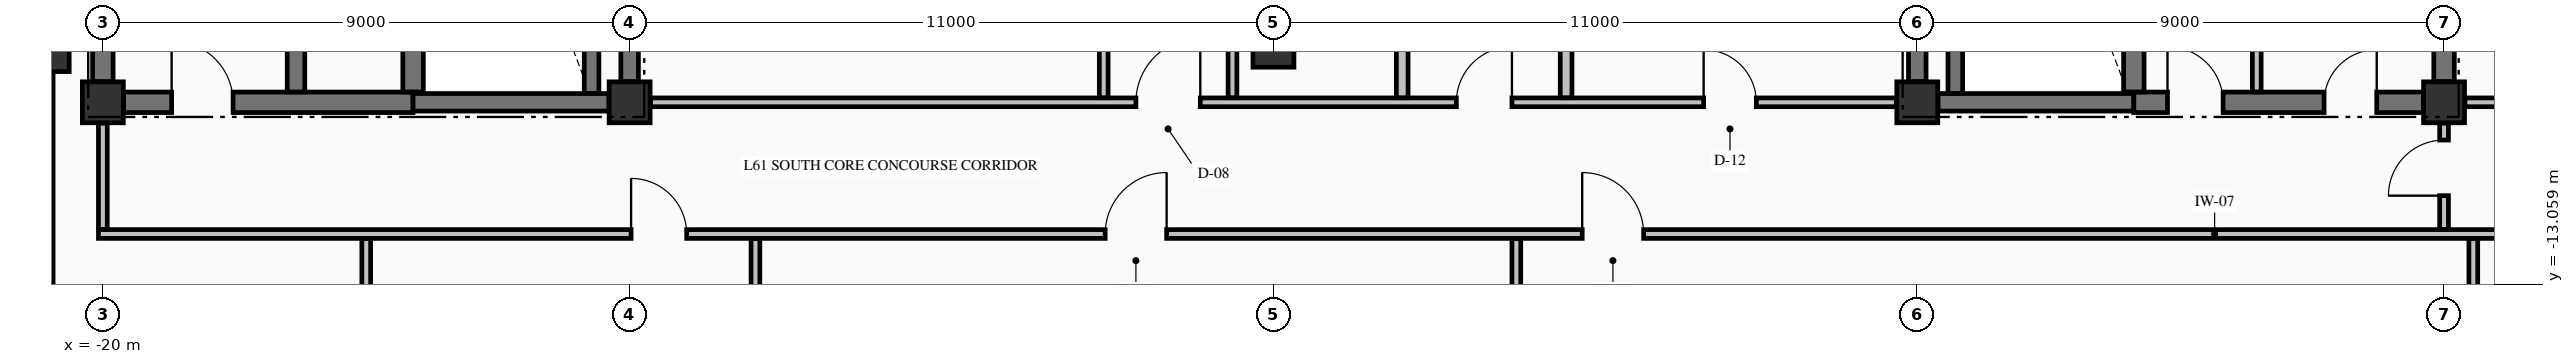
"""IFC4 building model, lengths in metres.
Left out: names, types, materials, properties, quantities, classifications, styles, units other than length and angle.
Written with IfcOpenShell. Run it as: python <this file> out.ifc"""

import sys

from ifc_helpers import new_model, si_unit, direction, frame, frame_2d, origin, origin_2d, place, context, subcontext, project, spatial, rectangle, extrude, element, fill, save


model = new_model("IFC4")
c1 = context("Model", 3, precision=1e-05, world=origin(), true_north=direction((0.0, 1.0)))
c2 = subcontext(c1, "Body", "Model", "MODEL_VIEW")
j1 = project(units=[si_unit("LENGTHUNIT", "METRE"), si_unit("PLANEANGLEUNIT", "RADIAN")], contexts=[c1])
p1 = place(None, origin())
s1 = spatial("IfcSite", under=j1, at=p1, CompositionType="ELEMENT")
p2 = place(p1, origin())
s2 = spatial("IfcBuilding", under=s1, at=p2, CompositionType="ELEMENT")
p3 = place(p2, frame((0.0, 0.0, 233.28)))
s3 = spatial("IfcBuildingStorey", under=s2, at=p3, CompositionType="ELEMENT", Elevation=233.28)
p4 = place(p3, frame((-21.0, -9.0, -0.25), z_axis=(0.0, 0.0, 1.0), x_axis=(1.0, 0.0, 0.0)))
e1 = element("IfcColumn", 1, at=p4, inside=s3, PredefinedType="COLUMN", context=c2, shape_type="SweptSolid", body=[
    extrude(rectangle(XDim=0.85, YDim=0.85, at=origin_2d()), origin(), (0.0, 0.0, 1.0), 3.23),
])
for number, where, z_axis, x_axis in (
    (2, (-20.0, -9.95, -0.25), (0.0, 0.0, 1.0), (1.0, 0.0, 0.0)),
    (3, (-11.0, -9.95, -0.25), (0.0, 0.0, 1.0), (1.0, 0.0, 0.0)),
    (4, (11.0, -9.95, -0.25), (0.0, 0.0, 1.0), (1.0, 0.0, 0.0)),
    (5, (20.0, -9.95, -0.25), (0.0, 0.0, 1.0), (1.0, 0.0, 0.0)),
    (6, (0.0, -9.0, -0.25), (0.0, 0.0, 1.0), (1.0, 0.0, 0.0)),
):
    element("IfcColumn", number, at=place(p3, frame(where, z_axis=z_axis, x_axis=x_axis)), inside=s3, PredefinedType="COLUMN", context=c2, shape_type="SweptSolid", body=[
        extrude(rectangle(XDim=0.7, YDim=0.7, at=origin_2d()), origin(), (0.0, 0.0, 1.0), 3.23),
    ])
p5 = place(p3, frame((-21.0, -9.455, 0.0), z_axis=(0.0, 0.0, 1.0), x_axis=(0.0, -1.0, 0.0)))
e7 = element("IfcWall", 7, at=p5, inside=s3, PredefinedType="STANDARD", context=c2, shape_type="SweptSolid", body=[
    extrude(rectangle(XDim=8.09, YDim=0.3, at=frame_2d((4.045, 0.0))), origin(), (0.0, 0.0, 1.0), 2.372),
])
p6 = place(p3, frame((-19.646, -9.95, 0.0), z_axis=(0.0, 0.0, 1.0), x_axis=(1.0, 0.0, 0.0)))
e8 = element("IfcWall", 8, at=p6, inside=s3, PredefinedType="SHEAR", context=c2, shape_type="SweptSolid", body=[
    extrude(rectangle(XDim=4.946, YDim=0.35, at=frame_2d((2.473, 0.0))), origin(), (0.0, 0.0, 1.0), 2.98),
])
p7 = place(p6, frame((0.821, 0.0, 0.0)))
e9 = element("IfcOpeningElement", 9, at=p7, cuts=e8, PredefinedType="OPENING", context=c2, shape_type="SweptSolid", body=[
    extrude(rectangle(XDim=1.05, YDim=2.15, at=frame_2d((0.525, 1.075))), frame((0.0, 0.185, 0.0), z_axis=(0.0, -1.0, 0.0), x_axis=(1.0, 0.0, 0.0)), (0.0, 0.0, 1.0), 0.37),
])
for number, where, z_axis, x_axis in (
    (10, (-14.7, -9.95, 0.0), (0.0, 0.0, 1.0), (1.0, 0.0, 0.0)),
    (11, (11.354, -9.95, 0.0), (0.0, 0.0, 1.0), (1.0, 0.0, 0.0)),
):
    element("IfcWall", number, at=place(p3, frame(where, z_axis=z_axis, x_axis=x_axis)), inside=s3, PredefinedType="SHEAR", context=c2, shape_type="SweptSolid", body=[
        extrude(rectangle(XDim=3.346, YDim=0.3, at=frame_2d((1.673, 0.0))), origin(), (0.0, 0.0, 1.0), 2.98),
    ])
p8 = place(p3, frame((14.7, -9.95, 0.0), z_axis=(0.0, 0.0, 1.0), x_axis=(1.0, 0.0, 0.0)))
e12 = element("IfcWall", 12, at=p8, inside=s3, PredefinedType="SHEAR", context=c2, shape_type="SweptSolid", body=[
    extrude(rectangle(XDim=4.946, YDim=0.35, at=frame_2d((2.473, 0.0))), origin(), (0.0, 0.0, 1.0), 2.98),
])
p9 = place(p8, frame((3.25, 0.0, 0.0)))
e13 = element("IfcOpeningElement", 13, at=p9, cuts=e12, PredefinedType="OPENING", context=c2, shape_type="SweptSolid", body=[
    extrude(rectangle(XDim=0.9, YDim=2.15, at=frame_2d((0.45, 1.075))), frame((0.0, 0.185, 0.0), z_axis=(0.0, -1.0, 0.0), x_axis=(1.0, 0.0, 0.0)), (0.0, 0.0, 1.0), 0.37),
])
p10 = place(p8, frame((0.575, 0.0, 0.0)))
e14 = element("IfcOpeningElement", 14, at=p10, cuts=e12, PredefinedType="OPENING", context=c2, shape_type="SweptSolid", body=[
    extrude(rectangle(XDim=0.95, YDim=2.15, at=frame_2d((0.475, 1.075))), frame((0.0, 0.185, 0.0), z_axis=(0.0, -1.0, 0.0), x_axis=(1.0, 0.0, 0.0)), (0.0, 0.0, 1.0), 0.37),
])
p11 = place(p3, frame((-20.075, -12.2, 0.0), z_axis=(0.0, 0.0, 1.0), x_axis=(1.0, 0.0, 0.0)))
e15 = element("IfcWall", 15, at=p11, inside=s3, PredefinedType="PARTITIONING", context=c2, shape_type="SweptSolid", body=[
    extrude(rectangle(XDim=45.91, YDim=0.15, at=frame_2d((22.955, 0.0))), origin(), (0.0, 0.0, 1.0), 2.98),
])
p12 = place(p11, frame((9.1, 0.0, 0.0)))
e16 = element("IfcOpeningElement", 16, at=p12, cuts=e15, PredefinedType="OPENING", context=c2, shape_type="SweptSolid", body=[
    extrude(rectangle(XDim=0.95, YDim=2.15, at=frame_2d((0.475, 1.075))), frame((0.0, 0.085, 0.0), z_axis=(0.0, -1.0, 0.0), x_axis=(1.0, 0.0, 0.0)), (0.0, 0.0, 1.0), 0.17),
])
p13 = place(p11, frame((17.2, 0.0, 0.0)))
e17 = element("IfcOpeningElement", 17, at=p13, cuts=e15, PredefinedType="OPENING", context=c2, shape_type="SweptSolid", body=[
    extrude(rectangle(XDim=1.05, YDim=2.15, at=frame_2d((0.525, 1.075))), frame((0.0, 0.085, 0.0), z_axis=(0.0, -1.0, 0.0), x_axis=(1.0, 0.0, 0.0)), (0.0, 0.0, 1.0), 0.17),
])
p14 = place(p11, frame((25.35, 0.0, 0.0)))
e18 = element("IfcOpeningElement", 18, at=p14, cuts=e15, PredefinedType="OPENING", context=c2, shape_type="SweptSolid", body=[
    extrude(rectangle(XDim=1.05, YDim=2.15, at=frame_2d((0.525, 1.075))), frame((0.0, 0.085, 0.0), z_axis=(0.0, -1.0, 0.0), x_axis=(1.0, 0.0, 0.0)), (0.0, 0.0, 1.0), 0.17),
])
p15 = place(p3, frame((-10.644, -9.95, 0.0), z_axis=(0.0, 0.0, 1.0), x_axis=(1.0, 0.0, 0.0)))
e19 = element("IfcWall", 19, at=p15, inside=s3, PredefinedType="PARTITIONING", context=c2, shape_type="SweptSolid", body=[
    extrude(rectangle(XDim=21.288, YDim=0.15, at=frame_2d((10.644, 0.0))), origin(), (0.0, 0.0, 1.0), 2.98),
])
p16 = place(p15, frame((8.294, 0.0, 0.0)))
e20 = element("IfcOpeningElement", 20, at=p16, cuts=e19, PredefinedType="OPENING", context=c2, shape_type="SweptSolid", body=[
    extrude(rectangle(XDim=1.1, YDim=2.15, at=frame_2d((0.55, 1.075))), frame((0.0, 0.085, 0.0), z_axis=(0.0, -1.0, 0.0), x_axis=(1.0, 0.0, 0.0)), (0.0, 0.0, 1.0), 0.17),
])
p17 = place(p15, frame((13.769, 0.0, 0.0)))
e21 = element("IfcOpeningElement", 21, at=p17, cuts=e19, PredefinedType="OPENING", context=c2, shape_type="SweptSolid", body=[
    extrude(rectangle(XDim=0.95, YDim=2.15, at=frame_2d((0.475, 1.075))), frame((0.0, 0.085, 0.0), z_axis=(0.0, -1.0, 0.0), x_axis=(1.0, 0.0, 0.0)), (0.0, 0.0, 1.0), 0.17),
])
p18 = place(p15, frame((17.994, 0.0, 0.0)))
e22 = element("IfcOpeningElement", 22, at=p18, cuts=e19, PredefinedType="OPENING", context=c2, shape_type="SweptSolid", body=[
    extrude(rectangle(XDim=0.9, YDim=2.15, at=frame_2d((0.45, 1.075))), frame((0.0, 0.085, 0.0), z_axis=(0.0, -1.0, 0.0), x_axis=(1.0, 0.0, 0.0)), (0.0, 0.0, 1.0), 0.17),
])
p19 = place(p3, frame((20.356, -9.95, 0.0), z_axis=(0.0, 0.0, 1.0), x_axis=(1.0, 0.0, 0.0)))
e23 = element("IfcWall", 23, at=p19, inside=s3, PredefinedType="PARTITIONING", context=c2, shape_type="SweptSolid", body=[
    extrude(rectangle(XDim=5.479, YDim=0.15, at=frame_2d((2.74, 0.0))), origin(), (0.0, 0.0, 1.0), 2.98),
])
p20 = place(p19, frame((2.169, 0.0, 0.0)))
e24 = element("IfcOpeningElement", 24, at=p20, cuts=e23, PredefinedType="OPENING", context=c2, shape_type="SweptSolid", body=[
    extrude(rectangle(XDim=0.95, YDim=2.15, at=frame_2d((0.475, 1.075))), frame((0.0, 0.085, 0.0), z_axis=(0.0, -1.0, 0.0), x_axis=(1.0, 0.0, 0.0)), (0.0, 0.0, 1.0), 0.17),
])
p21 = place(p3, frame((-20.0, -9.596, 0.0), z_axis=(0.0, 0.0, 1.0), x_axis=(0.0, 1.0, 0.0)))
e25 = element("IfcWall", 25, at=p21, inside=s3, PredefinedType="SHEAR", context=c2, shape_type="SweptSolid", body=[
    extrude(rectangle(XDim=9.194, YDim=0.35, at=frame_2d((4.597, 0.0))), origin(), (0.0, 0.0, 1.0), 2.98),
])
p22 = place(p3, frame((-16.7, -9.773, 0.0), z_axis=(0.0, 0.0, 1.0), x_axis=(0.0, 1.0, 0.0)))
e26 = element("IfcWall", 26, at=p22, inside=s3, PredefinedType="SHEAR", context=c2, shape_type="SweptSolid", body=[
    extrude(rectangle(XDim=9.371, YDim=0.3, at=frame_2d((4.686, 0.0))), origin(), (0.0, 0.0, 1.0), 2.98),
])
p23 = place(p3, frame((-14.7, -9.773, 0.0), z_axis=(0.0, 0.0, 1.0), x_axis=(0.0, 1.0, 0.0)))
e27 = element("IfcWall", 27, at=p23, inside=s3, PredefinedType="SHEAR", context=c2, shape_type="SweptSolid", body=[
    extrude(rectangle(XDim=9.371, YDim=0.35, at=frame_2d((4.686, 0.0))), origin(), (0.0, 0.0, 1.0), 2.98),
])
p24 = place(p3, frame((-11.65, -9.798, 0.0), z_axis=(0.0, 0.0, 1.0), x_axis=(0.0, 1.0, 0.0)))
e28 = element("IfcWall", 28, at=p24, inside=s3, PredefinedType="SOLIDWALL", context=c2, shape_type="SweptSolid", body=[
    extrude(rectangle(XDim=9.396, YDim=0.25, at=frame_2d((4.698, 0.0))), origin(), (0.0, 0.0, 1.0), 2.98),
])
for number, where, z_axis, x_axis in (
    (29, (-11.0, -9.596, 0.0), (0.0, 0.0, 1.0), (0.0, 1.0, 0.0)),
    (30, (11.0, -9.596, 0.0), (0.0, 0.0, 1.0), (0.0, 1.0, 0.0)),
):
    element("IfcWall", number, at=place(p3, frame(where, z_axis=z_axis, x_axis=x_axis)), inside=s3, PredefinedType="SHEAR", context=c2, shape_type="SweptSolid", body=[
        extrude(rectangle(XDim=9.242, YDim=0.3, at=frame_2d((4.621, 0.0))), origin(), (0.0, 0.0, 1.0), 2.98),
    ])
p25 = place(p3, frame((11.65, -9.798, 0.0), z_axis=(0.0, 0.0, 1.0), x_axis=(0.0, 1.0, 0.0)))
e31 = element("IfcWall", 31, at=p25, inside=s3, PredefinedType="SOLIDWALL", context=c2, shape_type="SweptSolid", body=[
    extrude(rectangle(XDim=9.396, YDim=0.25, at=frame_2d((4.698, 0.0))), origin(), (0.0, 0.0, 1.0), 2.98),
])
p26 = place(p3, frame((14.7, -9.773, 0.0), z_axis=(0.0, 0.0, 1.0), x_axis=(0.0, 1.0, 0.0)))
e32 = element("IfcWall", 32, at=p26, inside=s3, PredefinedType="SHEAR", context=c2, shape_type="SweptSolid", body=[
    extrude(rectangle(XDim=9.371, YDim=0.35, at=frame_2d((4.686, 0.0))), origin(), (0.0, 0.0, 1.0), 2.98),
])
p27 = place(p3, frame((20.0, -9.596, 0.0), z_axis=(0.0, 0.0, 1.0), x_axis=(0.0, 1.0, 0.0)))
e33 = element("IfcWall", 33, at=p27, inside=s3, PredefinedType="SHEAR", context=c2, shape_type="SweptSolid", body=[
    extrude(rectangle(XDim=9.242, YDim=0.35, at=frame_2d((4.621, 0.0))), origin(), (0.0, 0.0, 1.0), 2.98),
])
p28 = place(p3, frame((-20.0, -12.122, 0.0), z_axis=(0.0, 0.0, 1.0), x_axis=(0.0, 1.0, 0.0)))
e34 = element("IfcWall", 34, at=p28, inside=s3, PredefinedType="PARTITIONING", context=c2, shape_type="SweptSolid", body=[
    extrude(rectangle(XDim=1.816, YDim=0.15, at=frame_2d((0.908, 0.0))), origin(), (0.0, 0.0, 1.0), 2.57),
])
p29 = place(p3, frame((-15.5, -17.569, 0.0), z_axis=(0.0, 0.0, 1.0), x_axis=(0.0, 1.0, 0.0)))
e35 = element("IfcWall", 35, at=p29, inside=s3, PredefinedType="PARTITIONING", context=c2, shape_type="SweptSolid", body=[
    extrude(rectangle(XDim=5.291, YDim=0.15, at=frame_2d((2.646, 0.0))), origin(), (0.0, 0.0, 1.0), 2.98),
])
p30 = place(p3, frame((-8.85, -23.335, 0.0), z_axis=(0.0, 0.0, 1.0), x_axis=(0.0, 1.0, 0.0)))
e36 = element("IfcWall", 36, at=p30, inside=s3, PredefinedType="PARTITIONING", context=c2, shape_type="SweptSolid", body=[
    extrude(rectangle(XDim=11.057, YDim=0.15, at=frame_2d((5.528, 0.0))), origin(), (0.0, 0.0, 1.0), 2.98),
])
p31 = place(p3, frame((-2.9, -9.872, 0.0), z_axis=(0.0, 0.0, 1.0), x_axis=(0.0, 1.0, 0.0)))
e37 = element("IfcWall", 37, at=p31, inside=s3, PredefinedType="PARTITIONING", context=c2, shape_type="SweptSolid", body=[
    extrude(rectangle(XDim=9.544, YDim=0.15, at=frame_2d((4.772, 0.0))), origin(), (0.0, 0.0, 1.0), 2.98),
])
p32 = place(p3, frame((-0.7, -9.872, 0.0), z_axis=(0.0, 0.0, 1.0), x_axis=(0.0, 1.0, 0.0)))
e38 = element("IfcWall", 38, at=p32, inside=s3, PredefinedType="PARTITIONING", context=c2, shape_type="SweptSolid", body=[
    extrude(rectangle(XDim=5.519, YDim=0.15, at=frame_2d((2.76, 0.0))), origin(), (0.0, 0.0, 1.0), 2.98),
])
p33 = place(p32, frame((2.597, 0.0, 0.0)))
e39 = element("IfcOpeningElement", 39, at=p33, cuts=e38, PredefinedType="OPENING", context=c2, shape_type="SweptSolid", body=[
    extrude(rectangle(XDim=0.95, YDim=2.15, at=frame_2d((0.475, 1.075))), frame((0.0, 0.085, 0.0), z_axis=(0.0, -1.0, 0.0), x_axis=(1.0, 0.0, 0.0)), (0.0, 0.0, 1.0), 0.17),
])
p34 = place(p3, frame((2.2, -9.872, 0.0), z_axis=(0.0, 0.0, 1.0), x_axis=(0.0, 1.0, 0.0)))
e40 = element("IfcWall", 40, at=p34, inside=s3, PredefinedType="PARTITIONING", context=c2, shape_type="SweptSolid", body=[
    extrude(rectangle(XDim=5.519, YDim=0.2, at=frame_2d((2.76, 0.0))), origin(), (0.0, 0.0, 1.0), 2.98),
])
p35 = place(p3, frame((4.15, -23.335, 0.0), z_axis=(0.0, 0.0, 1.0), x_axis=(0.0, 1.0, 0.0)))
e41 = element("IfcWall", 41, at=p35, inside=s3, PredefinedType="PARTITIONING", context=c2, shape_type="SweptSolid", body=[
    extrude(rectangle(XDim=11.057, YDim=0.15, at=frame_2d((5.528, 0.0))), origin(), (0.0, 0.0, 1.0), 2.98),
])
p36 = place(p3, frame((5.0, -9.872, 0.0), z_axis=(0.0, 0.0, 1.0), x_axis=(0.0, 1.0, 0.0)))
e42 = element("IfcWall", 42, at=p36, inside=s3, PredefinedType="PARTITIONING", context=c2, shape_type="SweptSolid", body=[
    extrude(rectangle(XDim=5.519, YDim=0.2, at=frame_2d((2.76, 0.0))), origin(), (0.0, 0.0, 1.0), 2.98),
])
p37 = place(p3, frame((16.8, -9.772, 0.0), z_axis=(0.0, 0.0, 1.0), x_axis=(0.0, 1.0, 0.0)))
e43 = element("IfcWall", 43, at=p37, inside=s3, PredefinedType="PARTITIONING", context=c2, shape_type="SweptSolid", body=[
    extrude(rectangle(XDim=7.194, YDim=0.15, at=frame_2d((3.597, 0.0))), origin(), (0.0, 0.0, 1.0), 2.98),
])
p38 = place(p3, frame((20.0, -12.122, 0.0), z_axis=(0.0, 0.0, 1.0), x_axis=(0.0, 1.0, 0.0)))
e44 = element("IfcWall", 44, at=p38, inside=s3, PredefinedType="PARTITIONING", context=c2, shape_type="SweptSolid", body=[
    extrude(rectangle(XDim=1.816, YDim=0.15, at=frame_2d((0.908, 0.0))), origin(), (0.0, 0.0, 1.0), 2.98),
])
p39 = place(p38, frame((0.577, 0.0, 0.0)))
e45 = element("IfcOpeningElement", 45, at=p39, cuts=e44, PredefinedType="OPENING", context=c2, shape_type="SweptSolid", body=[
    extrude(rectangle(XDim=0.95, YDim=2.15, at=frame_2d((0.475, 1.075))), frame((0.0, 0.085, 0.0), z_axis=(0.0, -1.0, 0.0), x_axis=(1.0, 0.0, 0.0)), (0.0, 0.0, 1.0), 0.17),
])
p40 = place(p3, frame((20.5, -17.569, 0.0), z_axis=(0.0, 0.0, 1.0), x_axis=(0.0, 1.0, 0.0)))
e46 = element("IfcWall", 46, at=p40, inside=s3, PredefinedType="PARTITIONING", context=c2, shape_type="SweptSolid", body=[
    extrude(rectangle(XDim=5.291, YDim=0.15, at=frame_2d((2.646, 0.0))), origin(), (0.0, 0.0, 1.0), 2.98),
])
p41 = place(p7, origin())
e47 = element("IfcDoor", 47, at=p41, inside=s3, OperationType="SINGLE_SWING_LEFT", PredefinedType="DOOR", context=c2, shape_type="SweptSolid", body=[
    extrude(rectangle(XDim=1.05, YDim=2.15, at=frame_2d((0.525, 1.075))), frame((0.0, 0.025, 0.0), z_axis=(0.0, -1.0, 0.0), x_axis=(1.0, 0.0, 0.0)), (0.0, 0.0, 1.0), 0.05),
])
fill(e9, e47)
p42 = place(p9, origin())
e48 = element("IfcDoor", 48, at=p42, inside=s3, OperationType="SINGLE_SWING_RIGHT", PredefinedType="DOOR", context=c2, shape_type="SweptSolid", body=[
    extrude(rectangle(XDim=0.9, YDim=2.15, at=frame_2d((0.45, 1.075))), frame((0.0, 0.025, 0.0), z_axis=(0.0, -1.0, 0.0), x_axis=(1.0, 0.0, 0.0)), (0.0, 0.0, 1.0), 0.05),
])
fill(e13, e48)
p43 = place(p10, origin())
e49 = element("IfcDoor", 49, at=p43, inside=s3, OperationType="SINGLE_SWING_LEFT", PredefinedType="DOOR", context=c2, shape_type="SweptSolid", body=[
    extrude(rectangle(XDim=0.95, YDim=2.15, at=frame_2d((0.475, 1.075))), frame((0.0, 0.025, 0.0), z_axis=(0.0, -1.0, 0.0), x_axis=(1.0, 0.0, 0.0)), (0.0, 0.0, 1.0), 0.05),
])
fill(e14, e49)
p44 = place(p16, origin())
e50 = element("IfcDoor", 50, at=p44, inside=s3, OperationType="SINGLE_SWING_RIGHT", PredefinedType="DOOR", context=c2, shape_type="SweptSolid", body=[
    extrude(rectangle(XDim=1.1, YDim=2.15, at=frame_2d((0.55, 1.075))), frame((0.0, 0.025, 0.0), z_axis=(0.0, -1.0, 0.0), x_axis=(1.0, 0.0, 0.0)), (0.0, 0.0, 1.0), 0.05),
])
fill(e20, e50)
p45 = place(p12, origin())
e51 = element("IfcDoor", 51, at=p45, inside=s3, OperationType="SINGLE_SWING_LEFT", PredefinedType="DOOR", context=c2, shape_type="SweptSolid", body=[
    extrude(rectangle(XDim=0.95, YDim=2.15, at=frame_2d((0.475, 1.075))), frame((0.0, 0.025, 0.0), z_axis=(0.0, -1.0, 0.0), x_axis=(1.0, 0.0, 0.0)), (0.0, 0.0, 1.0), 0.05),
])
fill(e16, e51)
p46 = place(p13, origin())
e52 = element("IfcDoor", 52, at=p46, inside=s3, OperationType="SINGLE_SWING_RIGHT", PredefinedType="DOOR", context=c2, shape_type="SweptSolid", body=[
    extrude(rectangle(XDim=1.05, YDim=2.15, at=frame_2d((0.525, 1.075))), frame((0.0, 0.025, 0.0), z_axis=(0.0, -1.0, 0.0), x_axis=(1.0, 0.0, 0.0)), (0.0, 0.0, 1.0), 0.05),
])
fill(e17, e52)
p47 = place(p14, origin())
e53 = element("IfcDoor", 53, at=p47, inside=s3, OperationType="SINGLE_SWING_LEFT", PredefinedType="DOOR", context=c2, shape_type="SweptSolid", body=[
    extrude(rectangle(XDim=1.05, YDim=2.15, at=frame_2d((0.525, 1.075))), frame((0.0, 0.025, 0.0), z_axis=(0.0, -1.0, 0.0), x_axis=(1.0, 0.0, 0.0)), (0.0, 0.0, 1.0), 0.05),
])
fill(e18, e53)
p48 = place(p17, origin())
e54 = element("IfcDoor", 54, at=p48, inside=s3, OperationType="SINGLE_SWING_RIGHT", PredefinedType="DOOR", context=c2, shape_type="SweptSolid", body=[
    extrude(rectangle(XDim=0.95, YDim=2.15, at=frame_2d((0.475, 1.075))), frame((0.0, 0.025, 0.0), z_axis=(0.0, -1.0, 0.0), x_axis=(1.0, 0.0, 0.0)), (0.0, 0.0, 1.0), 0.05),
])
fill(e21, e54)
p49 = place(p18, origin())
e55 = element("IfcDoor", 55, at=p49, inside=s3, OperationType="SINGLE_SWING_LEFT", PredefinedType="DOOR", context=c2, shape_type="SweptSolid", body=[
    extrude(rectangle(XDim=0.9, YDim=2.15, at=frame_2d((0.45, 1.075))), frame((0.0, 0.025, 0.0), z_axis=(0.0, -1.0, 0.0), x_axis=(1.0, 0.0, 0.0)), (0.0, 0.0, 1.0), 0.05),
])
fill(e22, e55)
p50 = place(p39, origin())
e56 = element("IfcDoor", 56, at=p50, inside=s3, OperationType="SINGLE_SWING_LEFT", PredefinedType="DOOR", context=c2, shape_type="SweptSolid", body=[
    extrude(rectangle(XDim=0.95, YDim=2.15, at=frame_2d((0.475, 1.075))), frame((0.0, 0.025, 0.0), z_axis=(0.0, -1.0, 0.0), x_axis=(1.0, 0.0, 0.0)), (0.0, 0.0, 1.0), 0.05),
])
fill(e45, e56)
save(model, sys.argv[1])
